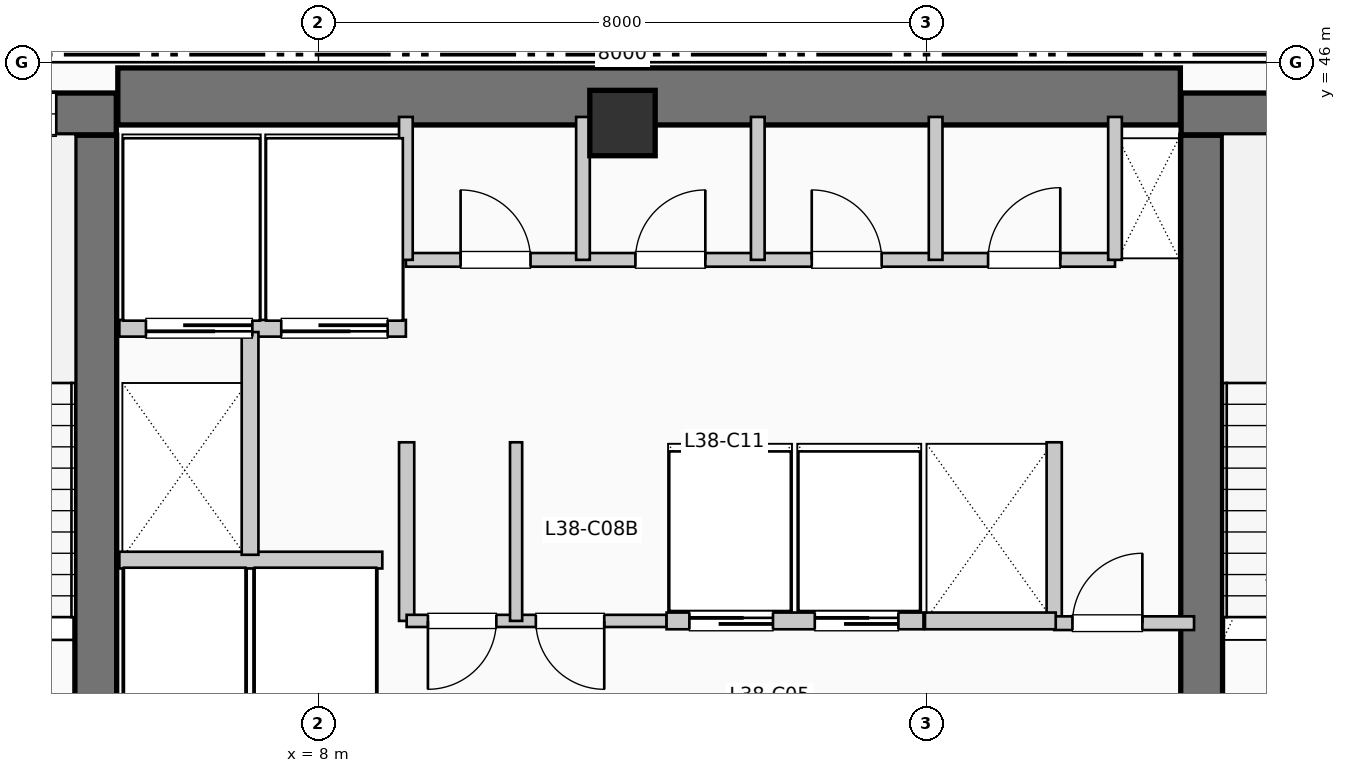
"""IFC4 building model, lengths in metres.
Left out: names, types, materials, properties, quantities, classifications, styles, units other than length and angle.
Written with IfcOpenShell. Run it as: python <this file> out.ifc"""

import sys

from ifc_helpers import new_model, si_unit, direction, frame, frame_2d, origin, origin_2d, place, context, subcontext, project, spatial, rectangle, extrude, element, fill, save


model = new_model("IFC4")
c1 = context("Model", 3, precision=1e-05, world=origin(), true_north=direction((0.0, 1.0)))
c2 = subcontext(c1, "Body", "Model", "MODEL_VIEW")
j1 = project(units=[si_unit("LENGTHUNIT", "METRE"), si_unit("PLANEANGLEUNIT", "RADIAN")], contexts=[c1])
p1 = place(None, origin())
s1 = spatial("IfcSite", under=j1, at=p1, CompositionType="ELEMENT")
p2 = place(p1, origin())
s2 = spatial("IfcBuilding", under=s1, at=p2, CompositionType="ELEMENT")
p3 = place(p2, frame((0.0, 0.0, 158.73)))
s3 = spatial("IfcBuildingStorey", under=s2, at=p3, CompositionType="ELEMENT", Elevation=158.73)
p4 = place(p3, frame((5.36, 45.55, 0.0), z_axis=(0.0, 0.0, 1.0), x_axis=(1.0, 0.0, 0.0)))
e1 = element("IfcWall", 1, at=p4, inside=s3, PredefinedType="SHEAR", context=c2, shape_type="SweptSolid", body=[
    extrude(rectangle(XDim=13.98, YDim=0.75, at=frame_2d((6.99, 0.0))), origin(), (0.0, 0.0, 1.0), 3.96),
])
p5 = place(p3, frame((5.07, 37.15, 0.0), z_axis=(0.0, 0.0, 1.0), x_axis=(0.0, 1.0, 0.0)))
e2 = element("IfcWall", 2, at=p5, inside=s3, PredefinedType="SHEAR", context=c2, shape_type="SweptSolid", body=[
    extrude(rectangle(XDim=7.89, YDim=0.55, at=frame_2d((3.945, 0.0))), origin(), (0.0, 0.0, 1.0), 3.96),
])
p6 = place(p3, frame((1.1, 45.32, 0.0), z_axis=(0.0, 0.0, 1.0), x_axis=(1.0, 0.0, 0.0)))
e3 = element("IfcWall", 3, at=p6, inside=s3, PredefinedType="SHEAR", context=c2, shape_type="SweptSolid", body=[
    extrude(rectangle(XDim=4.24, YDim=0.55, at=frame_2d((2.12, 0.0))), origin(), (0.0, 0.0, 1.0), 3.96),
])
p7 = place(p6, frame((2.05, 0.0, 1.05)))
e4 = element("IfcOpeningElement", 4, at=p7, cuts=e3, PredefinedType="OPENING", context=c2, shape_type="SweptSolid", body=[
    extrude(rectangle(XDim=1.4, YDim=1.8, at=frame_2d((0.7, 0.9))), frame((0.0, 0.285, 0.0), z_axis=(0.0, -1.0, 0.0), x_axis=(1.0, 0.0, 0.0)), (0.0, 0.0, 1.0), 0.57),
])
p8 = place(p3, frame((19.62, 37.15, 0.0), z_axis=(0.0, 0.0, 1.0), x_axis=(0.0, 1.0, 0.0)))
e5 = element("IfcWall", 5, at=p8, inside=s3, PredefinedType="SHEAR", context=c2, shape_type="SweptSolid", body=[
    extrude(rectangle(XDim=7.89, YDim=0.55, at=frame_2d((3.945, 0.0))), origin(), (0.0, 0.0, 1.0), 3.96),
])
p9 = place(p3, frame((19.35, 45.32, 0.0), z_axis=(0.0, 0.0, 1.0), x_axis=(1.0, 0.0, 0.0)))
e6 = element("IfcWall", 6, at=p9, inside=s3, PredefinedType="SHEAR", context=c2, shape_type="SweptSolid", body=[
    extrude(rectangle(XDim=3.69, YDim=0.55, at=frame_2d((1.845, 0.0))), origin(), (0.0, 0.0, 1.0), 3.96),
])
p10 = place(p9, frame((1.15, 0.0, 1.05)))
e7 = element("IfcOpeningElement", 7, at=p10, cuts=e6, PredefinedType="OPENING", context=c2, shape_type="SweptSolid", body=[
    extrude(rectangle(XDim=1.4, YDim=1.8, at=frame_2d((0.7, 0.9))), frame((0.0, 0.285, 0.0), z_axis=(0.0, -1.0, 0.0), x_axis=(1.0, 0.0, 0.0)), (0.0, 0.0, 1.0), 0.57),
])
p11 = place(p3, frame((12.0, 45.2, 0.0), z_axis=(0.0, 0.0, 1.0), x_axis=(1.0, 0.0, 0.0)))
e8 = element("IfcColumn", 8, at=p11, inside=s3, PredefinedType="COLUMN", context=c2, shape_type="SweptSolid", body=[
    extrude(rectangle(XDim=0.86, YDim=0.86, at=origin_2d()), origin(), (0.0, 0.0, 1.0), 3.96),
])
p12 = place(p3, frame((5.38, 39.45, 0.0), z_axis=(0.0, 0.0, 1.0), x_axis=(1.0, 0.0, 0.0)))
e9 = element("IfcWall", 9, at=p12, inside=s3, PredefinedType="PARTITIONING", context=c2, shape_type="SweptSolid", body=[
    extrude(rectangle(XDim=3.46, YDim=0.22, at=frame_2d((1.73, 0.0))), origin(), (0.0, 0.0, 1.0), 3.71),
])
p13 = place(p3, frame((5.38, 42.5, 0.0), z_axis=(0.0, 0.0, 1.0), x_axis=(1.0, 0.0, 0.0)))
e10 = element("IfcWall", 10, at=p13, inside=s3, PredefinedType="PARTITIONING", context=c2, shape_type="SweptSolid", body=[
    extrude(rectangle(XDim=3.77, YDim=0.22, at=frame_2d((1.885, 0.0))), origin(), (0.0, 0.0, 1.0), 3.71),
])
p14 = place(p13, frame((1.75, 0.0, 0.0), z_axis=(0.0, 0.0, 1.0), x_axis=(-1.0, 0.0, 0.0)))
e11 = element("IfcOpeningElement", 11, at=p14, cuts=e10, PredefinedType="OPENING", context=c2, shape_type="SweptSolid", body=[
    extrude(rectangle(XDim=1.4, YDim=2.2, at=frame_2d((0.7, 1.1))), frame((0.0, 0.12, 0.0), z_axis=(0.0, -1.0, 0.0), x_axis=(1.0, 0.0, 0.0)), (0.0, 0.0, 1.0), 0.24),
])
p15 = place(p13, frame((3.53, 0.0, 0.0), z_axis=(0.0, 0.0, 1.0), x_axis=(-1.0, 0.0, 0.0)))
e12 = element("IfcOpeningElement", 12, at=p15, cuts=e10, PredefinedType="OPENING", context=c2, shape_type="SweptSolid", body=[
    extrude(rectangle(XDim=1.4, YDim=2.2, at=frame_2d((0.7, 1.1))), frame((0.0, 0.12, 0.0), z_axis=(0.0, -1.0, 0.0), x_axis=(1.0, 0.0, 0.0)), (0.0, 0.0, 1.0), 0.24),
])
p16 = place(p3, frame((7.1, 39.52, 0.0), z_axis=(0.0, 0.0, 1.0), x_axis=(0.0, 1.0, 0.0)))
e13 = element("IfcWall", 13, at=p16, inside=s3, PredefinedType="PARTITIONING", context=c2, shape_type="SweptSolid", body=[
    extrude(rectangle(XDim=2.93, YDim=0.22, at=frame_2d((1.465, 0.0))), origin(), (0.0, 0.0, 1.0), 3.71),
])
for number, where, z_axis, x_axis in (
    (14, (9.16, 38.65, 0.0), (0.0, 0.0, 1.0), (0.0, 1.0, 0.0)),
    (15, (17.68, 38.65, 0.0), (0.0, 0.0, 1.0), (0.0, 1.0, 0.0)),
):
    element("IfcWall", number, at=place(p3, frame(where, z_axis=z_axis, x_axis=x_axis)), inside=s3, PredefinedType="PARTITIONING", context=c2, shape_type="SweptSolid", body=[
        extrude(rectangle(XDim=2.35, YDim=0.2, at=frame_2d((1.175, 0.0))), origin(), (0.0, 0.0, 1.0), 3.71),
    ])
p17 = place(p3, frame((17.68, 38.62, 0.0), z_axis=(0.0, 0.0, 1.0), x_axis=(1.0, 0.0, 0.0)))
e16 = element("IfcWall", 16, at=p17, inside=s3, PredefinedType="PARTITIONING", context=c2, shape_type="SweptSolid", body=[
    extrude(rectangle(XDim=1.84, YDim=0.18, at=frame_2d((0.92, 0.0))), origin(), (0.0, 0.0, 1.0), 3.71),
])
p18 = place(p17, frame((0.24, 0.0, 0.0)))
e17 = element("IfcOpeningElement", 17, at=p18, cuts=e16, PredefinedType="OPENING", context=c2, shape_type="SweptSolid", body=[
    extrude(rectangle(XDim=0.92, YDim=2.1, at=frame_2d((0.46, 1.05))), frame((0.0, 0.1, 0.0), z_axis=(0.0, -1.0, 0.0), x_axis=(1.0, 0.0, 0.0)), (0.0, 0.0, 1.0), 0.2),
])
p19 = place(p3, frame((9.16, 38.65, 0.0), z_axis=(0.0, 0.0, 1.0), x_axis=(1.0, 0.0, 0.0)))
e18 = element("IfcWall", 18, at=p19, inside=s3, PredefinedType="PARTITIONING", context=c2, shape_type="SweptSolid", body=[
    extrude(rectangle(XDim=3.42, YDim=0.16, at=frame_2d((1.71, 0.0))), origin(), (0.0, 0.0, 1.0), 3.71),
])
p20 = place(p19, frame((1.18, 0.0, 0.0), z_axis=(0.0, 0.0, 1.0), x_axis=(-1.0, 0.0, 0.0)))
e19 = element("IfcOpeningElement", 19, at=p20, cuts=e18, PredefinedType="OPENING", context=c2, shape_type="SweptSolid", body=[
    extrude(rectangle(XDim=0.9, YDim=2.15, at=frame_2d((0.45, 1.075))), frame((0.0, 0.09, 0.0), z_axis=(0.0, -1.0, 0.0), x_axis=(1.0, 0.0, 0.0)), (0.0, 0.0, 1.0), 0.18),
])
p21 = place(p19, frame((2.6, 0.0, 0.0), z_axis=(0.0, 0.0, 1.0), x_axis=(-1.0, 0.0, 0.0)))
e20 = element("IfcOpeningElement", 20, at=p21, cuts=e18, PredefinedType="OPENING", context=c2, shape_type="SweptSolid", body=[
    extrude(rectangle(XDim=0.9, YDim=2.15, at=frame_2d((0.45, 1.075))), frame((0.0, 0.09, 0.0), z_axis=(0.0, -1.0, 0.0), x_axis=(1.0, 0.0, 0.0)), (0.0, 0.0, 1.0), 0.18),
])
p22 = place(p3, frame((10.6, 38.65, 0.0), z_axis=(0.0, 0.0, 1.0), x_axis=(0.0, 1.0, 0.0)))
e21 = element("IfcWall", 21, at=p22, inside=s3, PredefinedType="PARTITIONING", context=c2, shape_type="SweptSolid", body=[
    extrude(rectangle(XDim=2.35, YDim=0.16, at=frame_2d((1.175, 0.0))), origin(), (0.0, 0.0, 1.0), 3.71),
])
p23 = place(p3, frame((12.58, 38.65, 0.0), z_axis=(0.0, 0.0, 1.0), x_axis=(1.0, 0.0, 0.0)))
e22 = element("IfcWall", 22, at=p23, inside=s3, PredefinedType="PARTITIONING", context=c2, shape_type="SweptSolid", body=[
    extrude(rectangle(XDim=3.38, YDim=0.22, at=frame_2d((1.69, 0.0))), origin(), (0.0, 0.0, 1.0), 3.71),
])
p24 = place(p23, frame((0.3, 0.0, 0.0)))
e23 = element("IfcOpeningElement", 23, at=p24, cuts=e22, PredefinedType="OPENING", context=c2, shape_type="SweptSolid", body=[
    extrude(rectangle(XDim=1.1, YDim=2.2, at=frame_2d((0.55, 1.1))), frame((0.0, 0.12, 0.0), z_axis=(0.0, -1.0, 0.0), x_axis=(1.0, 0.0, 0.0)), (0.0, 0.0, 1.0), 0.24),
])
p25 = place(p23, frame((1.95, 0.0, 0.0)))
e24 = element("IfcOpeningElement", 24, at=p25, cuts=e22, PredefinedType="OPENING", context=c2, shape_type="SweptSolid", body=[
    extrude(rectangle(XDim=1.1, YDim=2.2, at=frame_2d((0.55, 1.1))), frame((0.0, 0.12, 0.0), z_axis=(0.0, -1.0, 0.0), x_axis=(1.0, 0.0, 0.0)), (0.0, 0.0, 1.0), 0.24),
])
p26 = place(p3, frame((15.98, 38.65, 0.0), z_axis=(0.0, 0.0, 1.0), x_axis=(1.0, 0.0, 0.0)))
e25 = element("IfcWall", 25, at=p26, inside=s3, PredefinedType="PARTITIONING", context=c2, shape_type="SweptSolid", body=[
    extrude(rectangle(XDim=1.72, YDim=0.22, at=frame_2d((0.86, 0.0))), origin(), (0.0, 0.0, 1.0), 3.71),
])
p27 = place(p3, frame((9.15, 43.4, 0.0), z_axis=(0.0, 0.0, 1.0), x_axis=(1.0, 0.0, 0.0)))
e26 = element("IfcWall", 26, at=p27, inside=s3, PredefinedType="PLUMBINGWALL", context=c2, shape_type="SweptSolid", body=[
    extrude(rectangle(XDim=9.33, YDim=0.18, at=frame_2d((4.665, 0.0))), origin(), (0.0, 0.0, 1.0), 3.71),
])
p28 = place(p27, frame((0.72, 0.0, 0.0)))
e27 = element("IfcOpeningElement", 27, at=p28, cuts=e26, PredefinedType="OPENING", context=c2, shape_type="SweptSolid", body=[
    extrude(rectangle(XDim=0.92, YDim=2.1, at=frame_2d((0.46, 1.05))), frame((0.0, 0.1, 0.0), z_axis=(0.0, -1.0, 0.0), x_axis=(1.0, 0.0, 0.0)), (0.0, 0.0, 1.0), 0.2),
])
p29 = place(p27, frame((3.02, 0.0, 0.0)))
e28 = element("IfcOpeningElement", 28, at=p29, cuts=e26, PredefinedType="OPENING", context=c2, shape_type="SweptSolid", body=[
    extrude(rectangle(XDim=0.92, YDim=2.1, at=frame_2d((0.46, 1.05))), frame((0.0, 0.1, 0.0), z_axis=(0.0, -1.0, 0.0), x_axis=(1.0, 0.0, 0.0)), (0.0, 0.0, 1.0), 0.2),
])
p30 = place(p27, frame((5.34, 0.0, 0.0)))
e29 = element("IfcOpeningElement", 29, at=p30, cuts=e26, PredefinedType="OPENING", context=c2, shape_type="SweptSolid", body=[
    extrude(rectangle(XDim=0.92, YDim=2.1, at=frame_2d((0.46, 1.05))), frame((0.0, 0.1, 0.0), z_axis=(0.0, -1.0, 0.0), x_axis=(1.0, 0.0, 0.0)), (0.0, 0.0, 1.0), 0.2),
])
p31 = place(p27, frame((7.66, 0.0, 0.0)))
e30 = element("IfcOpeningElement", 30, at=p31, cuts=e26, PredefinedType="OPENING", context=c2, shape_type="SweptSolid", body=[
    extrude(rectangle(XDim=0.95, YDim=2.1, at=frame_2d((0.475, 1.05))), frame((0.0, 0.1, 0.0), z_axis=(0.0, -1.0, 0.0), x_axis=(1.0, 0.0, 0.0)), (0.0, 0.0, 1.0), 0.2),
])
for number, where, z_axis, x_axis in (
    (31, (9.15, 43.4, 0.0), (0.0, 0.0, 1.0), (0.0, 1.0, 0.0)),
    (32, (18.48, 43.4, 0.0), (0.0, 0.0, 1.0), (0.0, 1.0, 0.0)),
    (33, (11.48, 43.4, 0.0), (0.0, 0.0, 1.0), (0.0, 1.0, 0.0)),
    (34, (13.78, 43.4, 0.0), (0.0, 0.0, 1.0), (0.0, 1.0, 0.0)),
    (35, (16.12, 43.4, 0.0), (0.0, 0.0, 1.0), (0.0, 1.0, 0.0)),
):
    element("IfcWall", number, at=place(p3, frame(where, z_axis=z_axis, x_axis=x_axis)), inside=s3, PredefinedType="PLUMBINGWALL", context=c2, shape_type="SweptSolid", body=[
        extrude(rectangle(XDim=1.88, YDim=0.18, at=frame_2d((0.94, 0.0))), origin(), (0.0, 0.0, 1.0), 3.71),
    ])
p32 = place(p7, origin())
e36 = element("IfcWindow", 36, at=p32, inside=s3, PartitioningType="SINGLE_PANEL", PredefinedType="WINDOW", context=c2, shape_type="SweptSolid", body=[
    extrude(rectangle(XDim=1.4, YDim=1.8, at=frame_2d((0.7, 0.9))), frame((0.0, 0.03, 0.0), z_axis=(0.0, -1.0, 0.0), x_axis=(1.0, 0.0, 0.0)), (0.0, 0.0, 1.0), 0.06),
])
fill(e4, e36)
p33 = place(p14, origin())
e37 = element("IfcDoor", 37, at=p33, inside=s3, OperationType="SLIDING_TO_LEFT", PredefinedType="DOOR", context=c2, shape_type="SweptSolid", body=[
    extrude(rectangle(XDim=1.4, YDim=2.2, at=frame_2d((0.7, 1.1))), frame((0.0, 0.025, 0.0), z_axis=(0.0, -1.0, 0.0), x_axis=(1.0, 0.0, 0.0)), (0.0, 0.0, 1.0), 0.05),
])
fill(e11, e37)
p34 = place(p15, origin())
e38 = element("IfcDoor", 38, at=p34, inside=s3, OperationType="SLIDING_TO_LEFT", PredefinedType="DOOR", context=c2, shape_type="SweptSolid", body=[
    extrude(rectangle(XDim=1.4, YDim=2.2, at=frame_2d((0.7, 1.1))), frame((0.0, 0.025, 0.0), z_axis=(0.0, -1.0, 0.0), x_axis=(1.0, 0.0, 0.0)), (0.0, 0.0, 1.0), 0.05),
])
fill(e12, e38)
p35 = place(p18, origin())
e39 = element("IfcDoor", 39, at=p35, inside=s3, OperationType="SINGLE_SWING_RIGHT", PredefinedType="DOOR", context=c2, shape_type="SweptSolid", body=[
    extrude(rectangle(XDim=0.92, YDim=2.1, at=frame_2d((0.46, 1.05))), frame((0.0, 0.025, 0.0), z_axis=(0.0, -1.0, 0.0), x_axis=(1.0, 0.0, 0.0)), (0.0, 0.0, 1.0), 0.05),
])
fill(e17, e39)
p36 = place(p20, origin())
e40 = element("IfcDoor", 40, at=p36, inside=s3, OperationType="SINGLE_SWING_LEFT", PredefinedType="DOOR", context=c2, shape_type="SweptSolid", body=[
    extrude(rectangle(XDim=0.9, YDim=2.15, at=frame_2d((0.45, 1.075))), frame((0.0, 0.025, 0.0), z_axis=(0.0, -1.0, 0.0), x_axis=(1.0, 0.0, 0.0)), (0.0, 0.0, 1.0), 0.05),
])
fill(e19, e40)
p37 = place(p21, origin())
e41 = element("IfcDoor", 41, at=p37, inside=s3, OperationType="SINGLE_SWING_RIGHT", PredefinedType="DOOR", context=c2, shape_type="SweptSolid", body=[
    extrude(rectangle(XDim=0.9, YDim=2.15, at=frame_2d((0.45, 1.075))), frame((0.0, 0.025, 0.0), z_axis=(0.0, -1.0, 0.0), x_axis=(1.0, 0.0, 0.0)), (0.0, 0.0, 1.0), 0.05),
])
fill(e20, e41)
p38 = place(p24, origin())
e42 = element("IfcDoor", 42, at=p38, inside=s3, OperationType="SLIDING_TO_RIGHT", PredefinedType="DOOR", context=c2, shape_type="SweptSolid", body=[
    extrude(rectangle(XDim=1.1, YDim=2.2, at=frame_2d((0.55, 1.1))), frame((0.0, 0.025, 0.0), z_axis=(0.0, -1.0, 0.0), x_axis=(1.0, 0.0, 0.0)), (0.0, 0.0, 1.0), 0.05),
])
fill(e23, e42)
p39 = place(p25, origin())
e43 = element("IfcDoor", 43, at=p39, inside=s3, OperationType="SLIDING_TO_RIGHT", PredefinedType="DOOR", context=c2, shape_type="SweptSolid", body=[
    extrude(rectangle(XDim=1.1, YDim=2.2, at=frame_2d((0.55, 1.1))), frame((0.0, 0.025, 0.0), z_axis=(0.0, -1.0, 0.0), x_axis=(1.0, 0.0, 0.0)), (0.0, 0.0, 1.0), 0.05),
])
fill(e24, e43)
p40 = place(p28, origin())
e44 = element("IfcDoor", 44, at=p40, inside=s3, OperationType="SINGLE_SWING_LEFT", PredefinedType="DOOR", context=c2, shape_type="SweptSolid", body=[
    extrude(rectangle(XDim=0.92, YDim=2.1, at=frame_2d((0.46, 1.05))), frame((0.0, 0.025, 0.0), z_axis=(0.0, -1.0, 0.0), x_axis=(1.0, 0.0, 0.0)), (0.0, 0.0, 1.0), 0.05),
])
fill(e27, e44)
p41 = place(p29, origin())
e45 = element("IfcDoor", 45, at=p41, inside=s3, OperationType="SINGLE_SWING_RIGHT", PredefinedType="DOOR", context=c2, shape_type="SweptSolid", body=[
    extrude(rectangle(XDim=0.92, YDim=2.1, at=frame_2d((0.46, 1.05))), frame((0.0, 0.025, 0.0), z_axis=(0.0, -1.0, 0.0), x_axis=(1.0, 0.0, 0.0)), (0.0, 0.0, 1.0), 0.05),
])
fill(e28, e45)
p42 = place(p30, origin())
e46 = element("IfcDoor", 46, at=p42, inside=s3, OperationType="SINGLE_SWING_LEFT", PredefinedType="DOOR", context=c2, shape_type="SweptSolid", body=[
    extrude(rectangle(XDim=0.92, YDim=2.1, at=frame_2d((0.46, 1.05))), frame((0.0, 0.025, 0.0), z_axis=(0.0, -1.0, 0.0), x_axis=(1.0, 0.0, 0.0)), (0.0, 0.0, 1.0), 0.05),
])
fill(e29, e46)
p43 = place(p31, origin())
e47 = element("IfcDoor", 47, at=p43, inside=s3, OperationType="SINGLE_SWING_RIGHT", PredefinedType="DOOR", context=c2, shape_type="SweptSolid", body=[
    extrude(rectangle(XDim=0.95, YDim=2.1, at=frame_2d((0.475, 1.05))), frame((0.0, 0.025, 0.0), z_axis=(0.0, -1.0, 0.0), x_axis=(1.0, 0.0, 0.0)), (0.0, 0.0, 1.0), 0.05),
])
fill(e30, e47)
save(model, sys.argv[1])
